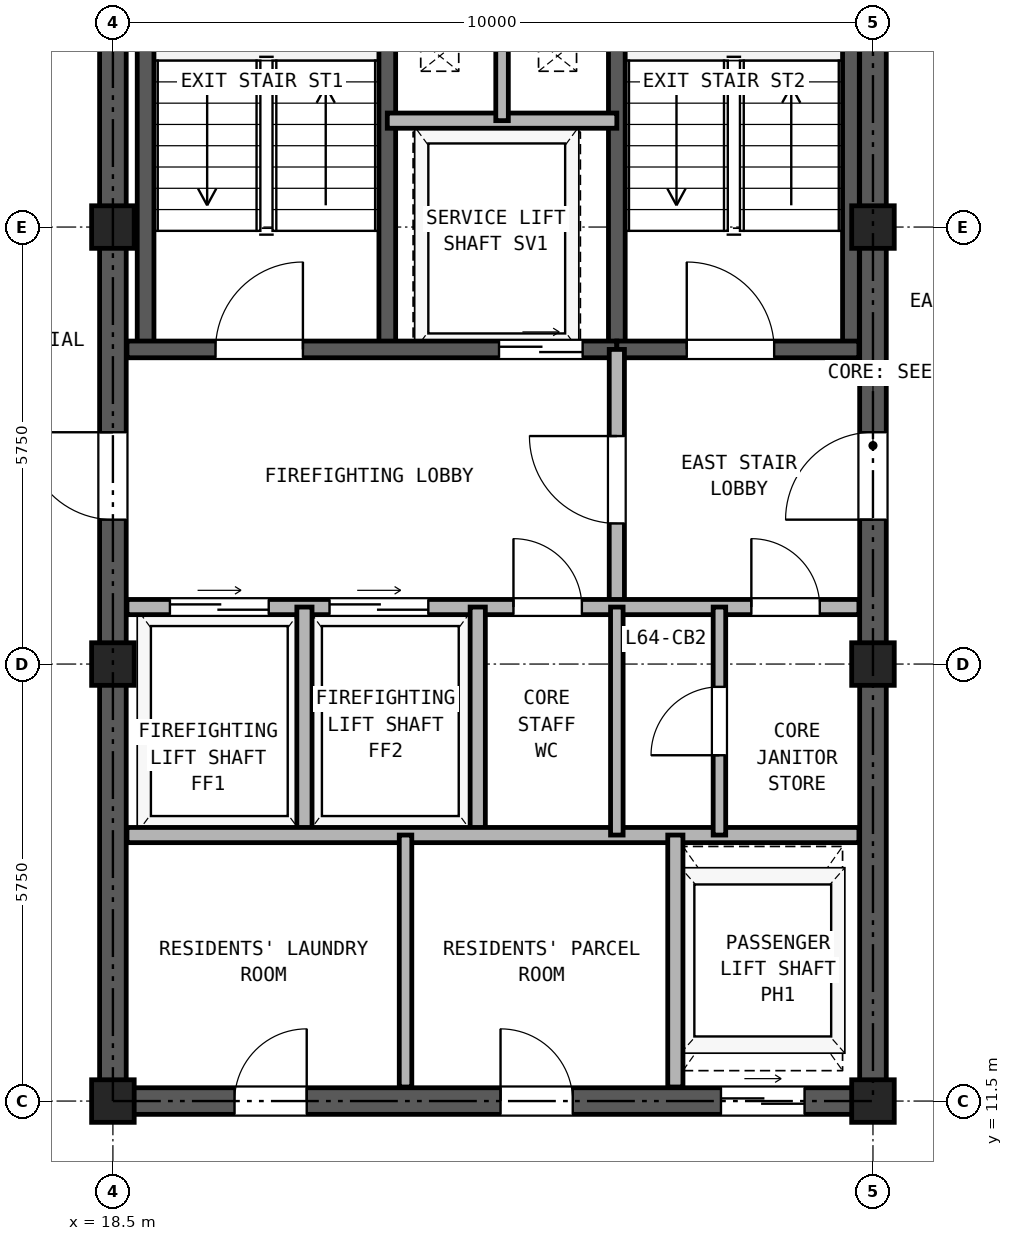
"""IFC4 building model, lengths in metres.
Left out: names, types, materials, properties, quantities, classifications, styles, units other than length and angle.
Written with IfcOpenShell. Run it as: python <this file> out.ifc"""

import sys

from ifc_helpers import new_model, si_unit, direction, frame, frame_2d, origin, origin_2d, place, context, subcontext, project, spatial, rectangle, hollow_rectangle, extrude, source, transform, mapped, element, fill, save


model = new_model("IFC4")
c1 = context("Model", 3, precision=1e-05, world=origin(), true_north=direction((0.0, 1.0)))
c2 = subcontext(c1, "Body", "Model", "MODEL_VIEW")
j1 = project(units=[si_unit("LENGTHUNIT", "METRE"), si_unit("PLANEANGLEUNIT", "RADIAN")], contexts=[c1])
p1 = place(None, origin())
s1 = spatial("IfcSite", under=j1, at=p1, CompositionType="ELEMENT")
p2 = place(p1, origin())
s2 = spatial("IfcBuilding", under=s1, at=p2, CompositionType="ELEMENT")
p3 = place(p2, frame((0.0, 0.0, 226.5)))
s3 = spatial("IfcBuildingStorey", under=s2, at=p3, CompositionType="ELEMENT", Elevation=226.5)
m1 = source(origin(), c2, "Body", "SweptSolid", [
    extrude(hollow_rectangle(XDim=0.56, YDim=0.56, WallThickness=0.03, at=origin_2d()), origin(), (0.0, 0.0, 1.0), 2.98),
])
for number, where, z_axis, x_axis in (
    (1, (18.5, 11.5, 0.0), (0.0, 0.0, 1.0), (1.0, 0.0, 0.0)),
    (2, (18.5, 17.25, 0.0), (0.0, 0.0, 1.0), (1.0, 0.0, 0.0)),
    (3, (18.5, 23.0, 0.0), (0.0, 0.0, 1.0), (1.0, 0.0, 0.0)),
    (4, (28.5, 11.5, 0.0), (0.0, 0.0, 1.0), (1.0, 0.0, 0.0)),
    (5, (28.5, 17.25, 0.0), (0.0, 0.0, 1.0), (1.0, 0.0, 0.0)),
    (6, (28.5, 23.0, 0.0), (0.0, 0.0, 1.0), (1.0, 0.0, 0.0)),
):
    element("IfcColumn", number, at=place(p3, frame(where, z_axis=z_axis, x_axis=x_axis)), inside=s3, PredefinedType="COLUMN", context=c2, shape_type="MappedRepresentation", body=[
        mapped(m1, transform((0.0, 0.0, 0.0), x_axis=(1.0, 0.0, 0.0), y_axis=(0.0, 1.0, 0.0), z_axis=(0.0, 0.0, 1.0), scale=1.0)),
    ])
p4 = place(p3, frame((18.325, 11.5, 0.0), z_axis=(0.0, 0.0, 1.0), x_axis=(1.0, 0.0, 0.0)))
e7 = element("IfcWall", 7, at=p4, inside=s3, PredefinedType="SHEAR", context=c2, shape_type="SweptSolid", body=[
    extrude(rectangle(XDim=10.35, YDim=0.35, at=frame_2d((5.175, 0.0))), origin(), (0.0, 0.0, 1.0), 2.98),
])
p5 = place(p4, frame((1.775, 0.0, 0.0)))
e8 = element("IfcOpeningElement", 8, at=p5, cuts=e7, PredefinedType="OPENING", context=c2, shape_type="SweptSolid", body=[
    extrude(rectangle(XDim=0.95, YDim=2.15, at=frame_2d((0.475, 1.075))), frame((0.0, 0.185, 0.0), z_axis=(0.0, -1.0, 0.0), x_axis=(1.0, 0.0, 0.0)), (0.0, 0.0, 1.0), 0.37),
])
p6 = place(p4, frame((5.275, 0.0, 0.0)))
e9 = element("IfcOpeningElement", 9, at=p6, cuts=e7, PredefinedType="OPENING", context=c2, shape_type="SweptSolid", body=[
    extrude(rectangle(XDim=0.95, YDim=2.15, at=frame_2d((0.475, 1.075))), frame((0.0, 0.185, 0.0), z_axis=(0.0, -1.0, 0.0), x_axis=(1.0, 0.0, 0.0)), (0.0, 0.0, 1.0), 0.37),
])
p7 = place(p4, frame((8.175, 0.0, 0.0)))
e10 = element("IfcOpeningElement", 10, at=p7, cuts=e7, PredefinedType="OPENING", context=c2, shape_type="SweptSolid", body=[
    extrude(rectangle(XDim=1.1, YDim=2.25, at=frame_2d((0.55, 1.125))), frame((0.0, 0.185, 0.0), z_axis=(0.0, -1.0, 0.0), x_axis=(1.0, 0.0, 0.0)), (0.0, 0.0, 1.0), 0.37),
])
p8 = place(p3, frame((18.5, 11.675, 0.0), z_axis=(0.0, 0.0, 1.0), x_axis=(0.0, 1.0, 0.0)))
e11 = element("IfcWall", 11, at=p8, inside=s3, PredefinedType="SHEAR", context=c2, shape_type="SweptSolid", body=[
    extrude(rectangle(XDim=16.9, YDim=0.35, at=frame_2d((8.45, 0.0))), origin(), (0.0, 0.0, 1.0), 2.98),
])
p9 = place(p8, frame((7.475, 0.0, 0.0)))
e12 = element("IfcOpeningElement", 12, at=p9, cuts=e11, PredefinedType="OPENING", context=c2, shape_type="SweptSolid", body=[
    extrude(rectangle(XDim=1.15, YDim=2.2, at=frame_2d((0.575, 1.1))), frame((0.0, 0.185, 0.0), z_axis=(0.0, -1.0, 0.0), x_axis=(1.0, 0.0, 0.0)), (0.0, 0.0, 1.0), 0.37),
])
p10 = place(p3, frame((28.5, 11.675, 0.0), z_axis=(0.0, 0.0, 1.0), x_axis=(0.0, 1.0, 0.0)))
e13 = element("IfcWall", 13, at=p10, inside=s3, PredefinedType="SHEAR", context=c2, shape_type="SweptSolid", body=[
    extrude(rectangle(XDim=16.9, YDim=0.35, at=frame_2d((8.45, 0.0))), origin(), (0.0, 0.0, 1.0), 2.98),
])
p11 = place(p10, frame((7.475, 0.0, 0.0)))
e14 = element("IfcOpeningElement", 14, at=p11, cuts=e13, PredefinedType="OPENING", context=c2, shape_type="SweptSolid", body=[
    extrude(rectangle(XDim=1.15, YDim=2.2, at=frame_2d((0.575, 1.1))), frame((0.0, 0.185, 0.0), z_axis=(0.0, -1.0, 0.0), x_axis=(1.0, 0.0, 0.0)), (0.0, 0.0, 1.0), 0.37),
])
for number, where, z_axis, x_axis in (
    (15, (18.93, 21.39, 0.0), (0.0, 0.0, 1.0), (0.0, 1.0, 0.0)),
    (16, (22.11, 21.39, 0.0), (0.0, 0.0, 1.0), (0.0, 1.0, 0.0)),
    (17, (25.13, 21.39, 0.0), (0.0, 0.0, 1.0), (0.0, 1.0, 0.0)),
):
    element("IfcWall", number, at=place(p3, frame(where, z_axis=z_axis, x_axis=x_axis)), inside=s3, PredefinedType="SOLIDWALL", context=c2, shape_type="SweptSolid", body=[
        extrude(rectangle(XDim=7.11, YDim=0.22, at=frame_2d((3.555, 0.0))), origin(), (0.0, 0.0, 1.0), 2.98),
    ])
p12 = place(p3, frame((28.21, 21.39, 0.0), z_axis=(0.0, 0.0, 1.0), x_axis=(0.0, 1.0, 0.0)))
e18 = element("IfcWall", 18, at=p12, inside=s3, PredefinedType="SOLIDWALL", context=c2, shape_type="SweptSolid", body=[
    extrude(rectangle(XDim=6.945, YDim=0.22, at=frame_2d((3.473, 0.0))), origin(), (0.0, 0.0, 1.0), 2.98),
])
p13 = place(p3, frame((18.685, 21.39, 0.0), z_axis=(0.0, 0.0, 1.0), x_axis=(1.0, 0.0, 0.0)))
e19 = element("IfcWall", 19, at=p13, inside=s3, PredefinedType="SOLIDWALL", context=c2, shape_type="SweptSolid", body=[
    extrude(rectangle(XDim=6.445, YDim=0.22, at=frame_2d((3.222, 0.0))), origin(), (0.0, 0.0, 1.0), 2.98),
])
p14 = place(p13, frame((1.165, 0.0, 0.0)))
e20 = element("IfcOpeningElement", 20, at=p14, cuts=e19, PredefinedType="OPENING", context=c2, shape_type="SweptSolid", body=[
    extrude(rectangle(XDim=1.15, YDim=2.2, at=frame_2d((0.575, 1.1))), frame((0.0, 0.12, 0.0), z_axis=(0.0, -1.0, 0.0), x_axis=(1.0, 0.0, 0.0)), (0.0, 0.0, 1.0), 0.24),
])
p15 = place(p13, frame((4.895, 0.0, 0.0)))
e21 = element("IfcOpeningElement", 21, at=p15, cuts=e19, PredefinedType="OPENING", context=c2, shape_type="SweptSolid", body=[
    extrude(rectangle(XDim=1.1, YDim=2.25, at=frame_2d((0.55, 1.125))), frame((0.0, 0.12, 0.0), z_axis=(0.0, -1.0, 0.0), x_axis=(1.0, 0.0, 0.0)), (0.0, 0.0, 1.0), 0.24),
])
p16 = place(p3, frame((25.13, 21.39, 0.0), z_axis=(0.0, 0.0, 1.0), x_axis=(1.0, 0.0, 0.0)))
e22 = element("IfcWall", 22, at=p16, inside=s3, PredefinedType="SOLIDWALL", context=c2, shape_type="SweptSolid", body=[
    extrude(rectangle(XDim=3.185, YDim=0.22, at=frame_2d((1.593, 0.0))), origin(), (0.0, 0.0, 1.0), 2.98),
])
p17 = place(p16, frame((0.92, 0.0, 0.0)))
e23 = element("IfcOpeningElement", 23, at=p17, cuts=e22, PredefinedType="OPENING", context=c2, shape_type="SweptSolid", body=[
    extrude(rectangle(XDim=1.15, YDim=2.2, at=frame_2d((0.575, 1.1))), frame((0.0, 0.12, 0.0), z_axis=(0.0, -1.0, 0.0), x_axis=(1.0, 0.0, 0.0)), (0.0, 0.0, 1.0), 0.24),
])
p18 = place(p3, frame((22.11, 24.4, 0.0), z_axis=(0.0, 0.0, 1.0), x_axis=(1.0, 0.0, 0.0)))
e24 = element("IfcWall", 24, at=p18, inside=s3, PredefinedType="PARTITIONING", context=c2, shape_type="SweptSolid", body=[
    extrude(rectangle(XDim=3.02, YDim=0.2, at=frame_2d((1.51, 0.0))), origin(), (0.0, 0.0, 1.0), 2.98),
])
p19 = place(p3, frame((23.62, 24.4, 0.0), z_axis=(0.0, 0.0, 1.0), x_axis=(0.0, 1.0, 0.0)))
e25 = element("IfcWall", 25, at=p19, inside=s3, PredefinedType="PARTITIONING", context=c2, shape_type="SweptSolid", body=[
    extrude(rectangle(XDim=4.165, YDim=0.165, at=frame_2d((2.083, 0.0))), origin(), (0.0, 0.0, 1.0), 2.98),
])
p20 = place(p3, frame((25.13, 18.0, 0.0), z_axis=(0.0, 0.0, 1.0), x_axis=(0.0, 1.0, 0.0)))
e26 = element("IfcWall", 26, at=p20, inside=s3, PredefinedType="PARTITIONING", context=c2, shape_type="SweptSolid", body=[
    extrude(rectangle(XDim=3.39, YDim=0.2, at=frame_2d((1.695, 0.0))), origin(), (0.0, 0.0, 1.0), 2.98),
])
p21 = place(p20, frame((1.1, 0.0, 0.0)))
e27 = element("IfcOpeningElement", 27, at=p21, cuts=e26, PredefinedType="OPENING", context=c2, shape_type="SweptSolid", body=[
    extrude(rectangle(XDim=1.15, YDim=2.2, at=frame_2d((0.575, 1.1))), frame((0.0, 0.11, 0.0), z_axis=(0.0, -1.0, 0.0), x_axis=(1.0, 0.0, 0.0)), (0.0, 0.0, 1.0), 0.22),
])
p22 = place(p3, frame((18.685, 18.0, 0.0), z_axis=(0.0, 0.0, 1.0), x_axis=(1.0, 0.0, 0.0)))
e28 = element("IfcWall", 28, at=p22, inside=s3, PredefinedType="PARTITIONING", context=c2, shape_type="SweptSolid", body=[
    extrude(rectangle(XDim=9.63, YDim=0.2, at=frame_2d((4.815, 0.0))), origin(), (0.0, 0.0, 1.0), 2.98),
])
p23 = place(p22, frame((0.565, 0.0, 0.0)))
e29 = element("IfcOpeningElement", 29, at=p23, cuts=e28, PredefinedType="OPENING", context=c2, shape_type="SweptSolid", body=[
    extrude(rectangle(XDim=1.3, YDim=2.3, at=frame_2d((0.65, 1.15))), frame((0.0, 0.11, 0.0), z_axis=(0.0, -1.0, 0.0), x_axis=(1.0, 0.0, 0.0)), (0.0, 0.0, 1.0), 0.22),
])
p24 = place(p22, frame((2.665, 0.0, 0.0)))
e30 = element("IfcOpeningElement", 30, at=p24, cuts=e28, PredefinedType="OPENING", context=c2, shape_type="SweptSolid", body=[
    extrude(rectangle(XDim=1.3, YDim=2.3, at=frame_2d((0.65, 1.15))), frame((0.0, 0.11, 0.0), z_axis=(0.0, -1.0, 0.0), x_axis=(1.0, 0.0, 0.0)), (0.0, 0.0, 1.0), 0.22),
])
p25 = place(p22, frame((5.085, 0.0, 0.0)))
e31 = element("IfcOpeningElement", 31, at=p25, cuts=e28, PredefinedType="OPENING", context=c2, shape_type="SweptSolid", body=[
    extrude(rectangle(XDim=0.9, YDim=2.05, at=frame_2d((0.45, 1.025))), frame((0.0, 0.11, 0.0), z_axis=(0.0, -1.0, 0.0), x_axis=(1.0, 0.0, 0.0)), (0.0, 0.0, 1.0), 0.22),
])
p26 = place(p22, frame((8.215, 0.0, 0.0)))
e32 = element("IfcOpeningElement", 32, at=p26, cuts=e28, PredefinedType="OPENING", context=c2, shape_type="SweptSolid", body=[
    extrude(rectangle(XDim=0.9, YDim=2.05, at=frame_2d((0.45, 1.025))), frame((0.0, 0.11, 0.0), z_axis=(0.0, -1.0, 0.0), x_axis=(1.0, 0.0, 0.0)), (0.0, 0.0, 1.0), 0.22),
])
for number, where, z_axis, x_axis in (
    (33, (21.02, 15.0, 0.0), (0.0, 0.0, 1.0), (0.0, 1.0, 0.0)),
    (34, (23.3, 15.0, 0.0), (0.0, 0.0, 1.0), (0.0, 1.0, 0.0)),
):
    element("IfcWall", number, at=place(p3, frame(where, z_axis=z_axis, x_axis=x_axis)), inside=s3, PredefinedType="PARTITIONING", context=c2, shape_type="SweptSolid", body=[
        extrude(rectangle(XDim=3.0, YDim=0.2, at=frame_2d((1.5, 0.0))), origin(), (0.0, 0.0, 1.0), 2.98),
    ])
p27 = place(p3, frame((18.685, 15.0, 0.0), z_axis=(0.0, 0.0, 1.0), x_axis=(1.0, 0.0, 0.0)))
e35 = element("IfcWall", 35, at=p27, inside=s3, PredefinedType="PARTITIONING", context=c2, shape_type="SweptSolid", body=[
    extrude(rectangle(XDim=9.63, YDim=0.2, at=frame_2d((4.815, 0.0))), origin(), (0.0, 0.0, 1.0), 2.98),
])
p28 = place(p3, frame((25.13, 15.0, 0.0), z_axis=(0.0, 0.0, 1.0), x_axis=(0.0, 1.0, 0.0)))
e36 = element("IfcWall", 36, at=p28, inside=s3, PredefinedType="PARTITIONING", context=c2, shape_type="SweptSolid", body=[
    extrude(rectangle(XDim=3.0, YDim=0.165, at=frame_2d((1.5, 0.0))), origin(), (0.0, 0.0, 1.0), 2.98),
])
p29 = place(p3, frame((26.48, 15.0, 0.0), z_axis=(0.0, 0.0, 1.0), x_axis=(0.0, 1.0, 0.0)))
e37 = element("IfcWall", 37, at=p29, inside=s3, PredefinedType="PARTITIONING", context=c2, shape_type="SweptSolid", body=[
    extrude(rectangle(XDim=3.0, YDim=0.165, at=frame_2d((1.5, 0.0))), origin(), (0.0, 0.0, 1.0), 2.98),
])
p30 = place(p29, frame((1.05, 0.0, 0.0)))
e38 = element("IfcOpeningElement", 38, at=p30, cuts=e37, PredefinedType="OPENING", context=c2, shape_type="SweptSolid", body=[
    extrude(rectangle(XDim=0.9, YDim=2.05, at=frame_2d((0.45, 1.025))), frame((0.0, 0.093, 0.0), z_axis=(0.0, -1.0, 0.0), x_axis=(1.0, 0.0, 0.0)), (0.0, 0.0, 1.0), 0.185),
])
p31 = place(p3, frame((22.35, 11.685, 0.0), z_axis=(0.0, 0.0, 1.0), x_axis=(0.0, 1.0, 0.0)))
e39 = element("IfcWall", 39, at=p31, inside=s3, PredefinedType="PARTITIONING", context=c2, shape_type="SweptSolid", body=[
    extrude(rectangle(XDim=3.315, YDim=0.165, at=frame_2d((1.657, 0.0))), origin(), (0.0, 0.0, 1.0), 2.98),
])
p32 = place(p3, frame((25.9, 11.685, 0.0), z_axis=(0.0, 0.0, 1.0), x_axis=(0.0, 1.0, 0.0)))
e40 = element("IfcWall", 40, at=p32, inside=s3, PredefinedType="PARTITIONING", context=c2, shape_type="SweptSolid", body=[
    extrude(rectangle(XDim=3.315, YDim=0.2, at=frame_2d((1.657, 0.0))), origin(), (0.0, 0.0, 1.0), 2.98),
])
p33 = place(p14, frame((1.15, 0.0, 0.0), z_axis=(0.0, 0.0, 1.0), x_axis=(-1.0, 0.0, 0.0)))
e41 = element("IfcDoor", 41, at=p33, inside=s3, OperationType="SINGLE_SWING_RIGHT", PredefinedType="DOOR", context=c2, shape_type="SweptSolid", body=[
    extrude(rectangle(XDim=1.15, YDim=2.2, at=frame_2d((0.575, 1.1))), frame((0.0, 0.025, 0.0), z_axis=(0.0, -1.0, 0.0), x_axis=(1.0, 0.0, 0.0)), (0.0, 0.0, 1.0), 0.05),
])
fill(e20, e41)
p34 = place(p17, frame((1.15, 0.0, 0.0), z_axis=(0.0, 0.0, 1.0), x_axis=(-1.0, 0.0, 0.0)))
e42 = element("IfcDoor", 42, at=p34, inside=s3, OperationType="SINGLE_SWING_LEFT", PredefinedType="DOOR", context=c2, shape_type="SweptSolid", body=[
    extrude(rectangle(XDim=1.15, YDim=2.2, at=frame_2d((0.575, 1.1))), frame((0.0, 0.025, 0.0), z_axis=(0.0, -1.0, 0.0), x_axis=(1.0, 0.0, 0.0)), (0.0, 0.0, 1.0), 0.05),
])
fill(e23, e42)
p35 = place(p15, frame((1.1, 0.0, 0.0), z_axis=(0.0, 0.0, 1.0), x_axis=(-1.0, 0.0, 0.0)))
e43 = element("IfcDoor", 43, at=p35, inside=s3, OperationType="DOUBLE_DOOR_SLIDING", PredefinedType="DOOR", context=c2, shape_type="SweptSolid", body=[
    extrude(rectangle(XDim=1.1, YDim=2.25, at=frame_2d((0.55, 1.125))), frame((0.0, 0.025, 0.0), z_axis=(0.0, -1.0, 0.0), x_axis=(1.0, 0.0, 0.0)), (0.0, 0.0, 1.0), 0.05),
])
fill(e21, e43)
p36 = place(p21, origin())
e44 = element("IfcDoor", 44, at=p36, inside=s3, OperationType="SINGLE_SWING_RIGHT", PredefinedType="DOOR", context=c2, shape_type="SweptSolid", body=[
    extrude(rectangle(XDim=1.15, YDim=2.2, at=frame_2d((0.575, 1.1))), frame((0.0, 0.025, 0.0), z_axis=(0.0, -1.0, 0.0), x_axis=(1.0, 0.0, 0.0)), (0.0, 0.0, 1.0), 0.05),
])
fill(e27, e44)
p37 = place(p23, origin())
e45 = element("IfcDoor", 45, at=p37, inside=s3, OperationType="DOUBLE_DOOR_SLIDING", PredefinedType="DOOR", context=c2, shape_type="SweptSolid", body=[
    extrude(rectangle(XDim=1.3, YDim=2.3, at=frame_2d((0.65, 1.15))), frame((0.0, 0.025, 0.0), z_axis=(0.0, -1.0, 0.0), x_axis=(1.0, 0.0, 0.0)), (0.0, 0.0, 1.0), 0.05),
])
fill(e29, e45)
p38 = place(p24, origin())
e46 = element("IfcDoor", 46, at=p38, inside=s3, OperationType="DOUBLE_DOOR_SLIDING", PredefinedType="DOOR", context=c2, shape_type="SweptSolid", body=[
    extrude(rectangle(XDim=1.3, YDim=2.3, at=frame_2d((0.65, 1.15))), frame((0.0, 0.025, 0.0), z_axis=(0.0, -1.0, 0.0), x_axis=(1.0, 0.0, 0.0)), (0.0, 0.0, 1.0), 0.05),
])
fill(e30, e46)
p39 = place(p25, frame((0.9, 0.0, 0.0), z_axis=(0.0, 0.0, 1.0), x_axis=(-1.0, 0.0, 0.0)))
e47 = element("IfcDoor", 47, at=p39, inside=s3, OperationType="SINGLE_SWING_LEFT", PredefinedType="DOOR", context=c2, shape_type="SweptSolid", body=[
    extrude(rectangle(XDim=0.9, YDim=2.05, at=frame_2d((0.45, 1.025))), frame((0.0, 0.025, 0.0), z_axis=(0.0, -1.0, 0.0), x_axis=(1.0, 0.0, 0.0)), (0.0, 0.0, 1.0), 0.05),
])
fill(e31, e47)
p40 = place(p30, origin())
e48 = element("IfcDoor", 48, at=p40, inside=s3, OperationType="SINGLE_SWING_LEFT", PredefinedType="DOOR", context=c2, shape_type="SweptSolid", body=[
    extrude(rectangle(XDim=0.9, YDim=2.05, at=frame_2d((0.45, 1.025))), frame((0.0, 0.025, 0.0), z_axis=(0.0, -1.0, 0.0), x_axis=(1.0, 0.0, 0.0)), (0.0, 0.0, 1.0), 0.05),
])
fill(e38, e48)
p41 = place(p26, frame((0.9, 0.0, 0.0), z_axis=(0.0, 0.0, 1.0), x_axis=(-1.0, 0.0, 0.0)))
e49 = element("IfcDoor", 49, at=p41, inside=s3, OperationType="SINGLE_SWING_LEFT", PredefinedType="DOOR", context=c2, shape_type="SweptSolid", body=[
    extrude(rectangle(XDim=0.9, YDim=2.05, at=frame_2d((0.45, 1.025))), frame((0.0, 0.025, 0.0), z_axis=(0.0, -1.0, 0.0), x_axis=(1.0, 0.0, 0.0)), (0.0, 0.0, 1.0), 0.05),
])
fill(e32, e49)
p42 = place(p9, frame((1.15, 0.0, 0.0), z_axis=(0.0, 0.0, 1.0), x_axis=(-1.0, 0.0, 0.0)))
e50 = element("IfcDoor", 50, at=p42, inside=s3, OperationType="SINGLE_SWING_RIGHT", PredefinedType="DOOR", context=c2, shape_type="SweptSolid", body=[
    extrude(rectangle(XDim=1.15, YDim=2.2, at=frame_2d((0.575, 1.1))), frame((0.0, 0.025, 0.0), z_axis=(0.0, -1.0, 0.0), x_axis=(1.0, 0.0, 0.0)), (0.0, 0.0, 1.0), 0.05),
])
fill(e12, e50)
p43 = place(p11, origin())
e51 = element("IfcDoor", 51, at=p43, inside=s3, OperationType="SINGLE_SWING_LEFT", PredefinedType="DOOR", context=c2, shape_type="SweptSolid", body=[
    extrude(rectangle(XDim=1.15, YDim=2.2, at=frame_2d((0.575, 1.1))), frame((0.0, 0.025, 0.0), z_axis=(0.0, -1.0, 0.0), x_axis=(1.0, 0.0, 0.0)), (0.0, 0.0, 1.0), 0.05),
])
fill(e14, e51)
p44 = place(p5, frame((0.95, 0.0, 0.0), z_axis=(0.0, 0.0, 1.0), x_axis=(-1.0, 0.0, 0.0)))
e52 = element("IfcDoor", 52, at=p44, inside=s3, OperationType="SINGLE_SWING_RIGHT", PredefinedType="DOOR", context=c2, shape_type="SweptSolid", body=[
    extrude(rectangle(XDim=0.95, YDim=2.15, at=frame_2d((0.475, 1.075))), frame((0.0, 0.025, 0.0), z_axis=(0.0, -1.0, 0.0), x_axis=(1.0, 0.0, 0.0)), (0.0, 0.0, 1.0), 0.05),
])
fill(e8, e52)
p45 = place(p6, frame((0.95, 0.0, 0.0), z_axis=(0.0, 0.0, 1.0), x_axis=(-1.0, 0.0, 0.0)))
e53 = element("IfcDoor", 53, at=p45, inside=s3, OperationType="SINGLE_SWING_LEFT", PredefinedType="DOOR", context=c2, shape_type="SweptSolid", body=[
    extrude(rectangle(XDim=0.95, YDim=2.15, at=frame_2d((0.475, 1.075))), frame((0.0, 0.025, 0.0), z_axis=(0.0, -1.0, 0.0), x_axis=(1.0, 0.0, 0.0)), (0.0, 0.0, 1.0), 0.05),
])
fill(e9, e53)
p46 = place(p7, frame((1.1, 0.0, 0.0), z_axis=(0.0, 0.0, 1.0), x_axis=(-1.0, 0.0, 0.0)))
e54 = element("IfcDoor", 54, at=p46, inside=s3, OperationType="DOUBLE_DOOR_SLIDING", PredefinedType="DOOR", context=c2, shape_type="SweptSolid", body=[
    extrude(rectangle(XDim=1.1, YDim=2.25, at=frame_2d((0.55, 1.125))), frame((0.0, 0.025, 0.0), z_axis=(0.0, -1.0, 0.0), x_axis=(1.0, 0.0, 0.0)), (0.0, 0.0, 1.0), 0.05),
])
fill(e10, e54)
save(model, sys.argv[1])
